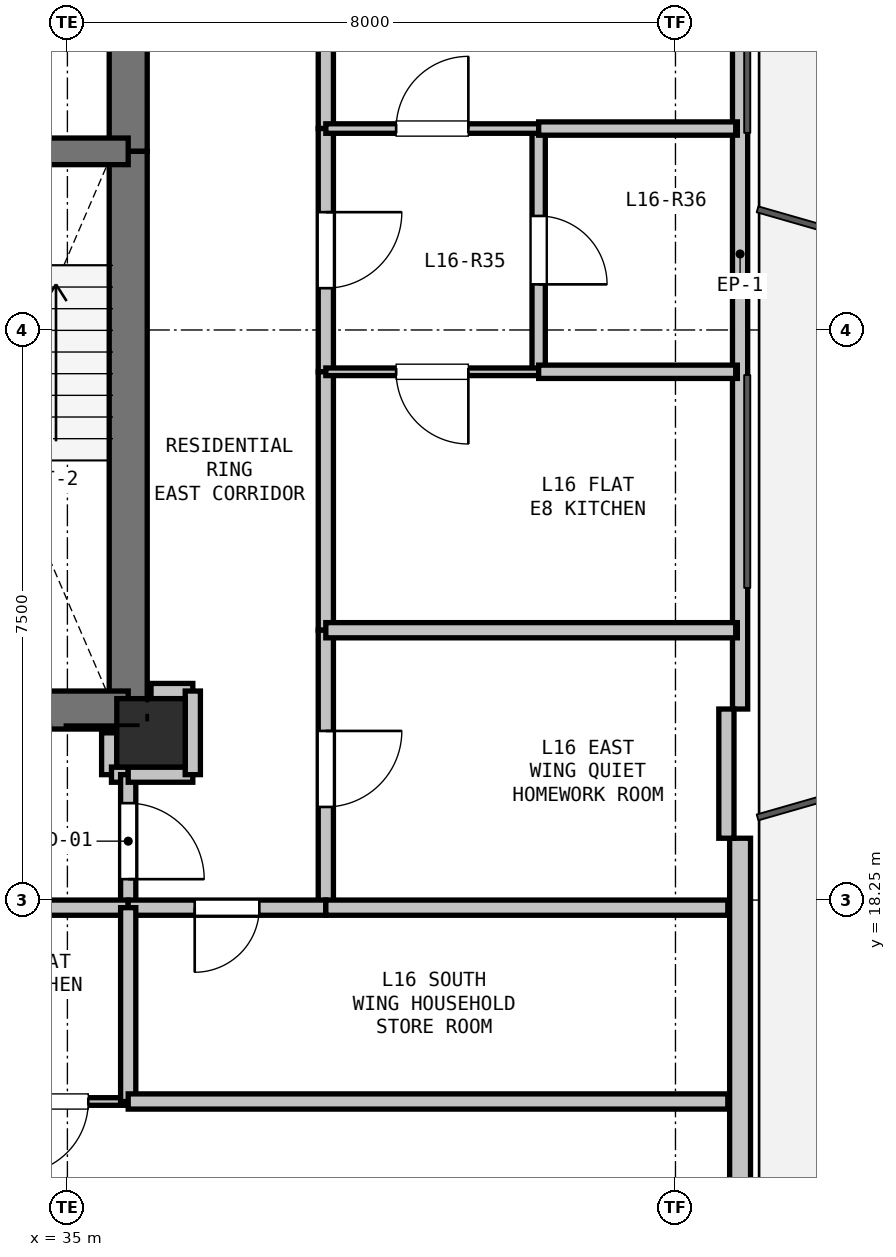
"""IFC4 building model, lengths in metres.
Left out: names, types, materials, properties, quantities, classifications, styles, units other than length and angle.
Written with IfcOpenShell. Run it as: python <this file> out.ifc"""

import sys

from ifc_helpers import new_model, si_unit, direction, frame, frame_2d, origin, origin_2d, place, context, subcontext, project, spatial, rectangle, extrude, element, fill, save


model = new_model("IFC4")
c1 = context("Model", 3, precision=1e-05, world=origin(), true_north=direction((0.0, 1.0)))
c2 = subcontext(c1, "Body", "Model", "MODEL_VIEW")
j1 = project(units=[si_unit("LENGTHUNIT", "METRE"), si_unit("PLANEANGLEUNIT", "RADIAN")], contexts=[c1])
p1 = place(None, origin())
s1 = spatial("IfcSite", under=j1, at=p1, CompositionType="ELEMENT")
p2 = place(p1, origin())
s2 = spatial("IfcBuilding", under=s1, at=p2, CompositionType="ELEMENT")
p3 = place(p2, frame((0.0, 0.0, 58.8)))
s3 = spatial("IfcBuildingStorey", under=s2, at=p3, CompositionType="ELEMENT", Elevation=58.8)
p4 = place(p3, frame((36.1, 20.45, 0.0), z_axis=(0.0, 0.0, 1.0), x_axis=(1.0, 0.0, 0.0)))
e1 = element("IfcColumn", 1, at=p4, inside=s3, PredefinedType="COLUMN", context=c2, shape_type="SweptSolid", body=[
    extrude(rectangle(XDim=0.9, YDim=0.9, at=origin_2d()), origin(), (0.0, 0.0, 1.0), 3.3),
])
p5 = place(p3, frame((43.85, 32.737, 0.0), z_axis=(0.0, 0.0, 1.0), x_axis=(0.0, -1.0, 0.0)))
e2 = element("IfcWall", 2, at=p5, inside=s3, PredefinedType="PARAPET", context=c2, shape_type="SweptSolid", body=[
    extrude(rectangle(XDim=11.973, YDim=0.2, at=frame_2d((5.987, 0.0))), origin(), (0.0, 0.0, 1.0), 0.2),
])
p6 = place(p3, frame((43.85, 19.063, 0.0), z_axis=(0.0, 0.0, 1.0), x_axis=(0.0, -1.0, 0.0)))
e3 = element("IfcWall", 3, at=p6, inside=s3, PredefinedType="SOLIDWALL", context=c2, shape_type="SweptSolid", body=[
    extrude(rectangle(XDim=12.673, YDim=0.275, at=frame_2d((6.336, 0.0))), origin(), (0.0, 0.0, 1.0), 2.64),
])
p7 = place(p3, frame((43.67, 20.763, 0.0), z_axis=(0.0, 0.0, 1.0), x_axis=(0.0, -1.0, 0.0)))
e4 = element("IfcWall", 4, at=p7, inside=s3, PredefinedType="PARAPET", context=c2, shape_type="SweptSolid", body=[
    extrude(rectangle(XDim=1.7, YDim=0.2, at=frame_2d((0.85, 0.0))), origin(), (0.0, 0.0, 1.0), 2.64),
])
p8 = place(p3, frame((35.8, 32.75, 0.0), z_axis=(0.0, 0.0, 1.0), x_axis=(0.0, -1.0, 0.0)))
e5 = element("IfcWall", 5, at=p8, inside=s3, PredefinedType="SHEAR", context=c2, shape_type="SweptSolid", body=[
    extrude(rectangle(XDim=4.65, YDim=0.5, at=frame_2d((2.325, 0.0))), origin(), (0.0, 0.0, 1.0), 3.02),
])
p9 = place(p3, frame((35.8, 28.1, 0.0), z_axis=(0.0, 0.0, 1.0), x_axis=(0.0, -1.0, 0.0)))
e6 = element("IfcWall", 6, at=p9, inside=s3, PredefinedType="SHEAR", context=c2, shape_type="SweptSolid", body=[
    extrude(rectangle(XDim=7.35, YDim=0.5, at=frame_2d((3.675, 0.0))), origin(), (0.0, 0.0, 1.0), 3.02),
])
p10 = place(p3, frame((35.8, 20.75, 0.0), z_axis=(0.0, 0.0, 1.0), x_axis=(-1.0, 0.0, 0.0)))
e7 = element("IfcWall", 7, at=p10, inside=s3, PredefinedType="SHEAR", context=c2, shape_type="SweptSolid", body=[
    extrude(rectangle(XDim=3.45, YDim=0.5, at=frame_2d((1.725, 0.0))), origin(), (0.0, 0.0, 1.0), 3.02),
])
p11 = place(p3, frame((32.35, 28.1, 0.0), z_axis=(0.0, 0.0, 1.0), x_axis=(1.0, 0.0, 0.0)))
e8 = element("IfcWall", 8, at=p11, inside=s3, PredefinedType="SHEAR", context=c2, shape_type="SweptSolid", body=[
    extrude(rectangle(XDim=3.45, YDim=0.35, at=frame_2d((1.725, 0.0))), origin(), (0.0, 0.0, 1.0), 3.02),
])
p12 = place(p11, frame((1.15, 0.0, 0.0)))
e9 = element("IfcOpeningElement", 9, at=p12, cuts=e8, PredefinedType="OPENING", context=c2, shape_type="SweptSolid", body=[
    extrude(rectangle(XDim=1.15, YDim=2.15, at=frame_2d((0.575, 1.075))), frame((0.0, 0.185, 0.0), z_axis=(0.0, -1.0, 0.0), x_axis=(1.0, 0.0, 0.0)), (0.0, 0.0, 1.0), 0.37),
])
p13 = place(p3, frame((35.55, 20.45, 0.0), z_axis=(0.0, 0.0, 1.0), x_axis=(0.0, -1.0, 0.0)))
e10 = element("IfcWall", 10, at=p13, inside=s3, PredefinedType="PARTITIONING", context=c2, shape_type="SweptSolid", body=[
    extrude(rectangle(XDim=0.55, YDim=0.2, at=frame_2d((0.275, 0.0))), origin(), (0.0, 0.0, 1.0), 2.468),
])
p14 = place(p3, frame((35.58, 19.9, 0.0), z_axis=(0.0, 0.0, 1.0), x_axis=(1.0, 0.0, 0.0)))
e11 = element("IfcWall", 11, at=p14, inside=s3, PredefinedType="PARTITIONING", context=c2, shape_type="SweptSolid", body=[
    extrude(rectangle(XDim=0.22, YDim=0.2, at=frame_2d((0.11, 0.0))), origin(), (0.0, 0.0, 1.0), 3.02),
])
p15 = place(p3, frame((35.8, 19.9, 0.0), z_axis=(0.0, 0.0, 1.0), x_axis=(0.0, -1.0, 0.0)))
e12 = element("IfcWall", 12, at=p15, inside=s3, PredefinedType="PARTITIONING", context=c2, shape_type="SweptSolid", body=[
    extrude(rectangle(XDim=1.75, YDim=0.2, at=frame_2d((0.875, 0.0))), origin(), (0.0, 0.0, 1.0), 3.02),
])
p16 = place(p15, frame((0.375, 0.0, 0.0)))
e13 = element("IfcOpeningElement", 13, at=p16, cuts=e12, PredefinedType="OPENING", context=c2, shape_type="SweptSolid", body=[
    extrude(rectangle(XDim=1.0, YDim=2.15, at=frame_2d((0.5, 1.075))), frame((0.0, 0.11, 0.0), z_axis=(0.0, -1.0, 0.0), x_axis=(1.0, 0.0, 0.0)), (0.0, 0.0, 1.0), 0.22),
])
p17 = place(p3, frame((35.8, 18.15, 0.0), z_axis=(0.0, 0.0, 1.0), x_axis=(-1.0, 0.0, 0.0)))
e14 = element("IfcWall", 14, at=p17, inside=s3, PredefinedType="PARTITIONING", context=c2, shape_type="SweptSolid", body=[
    extrude(rectangle(XDim=3.6, YDim=0.2, at=frame_2d((1.8, 0.0))), origin(), (0.0, 0.0, 1.0), 3.02),
])
p18 = place(p3, frame((36.65, 21.0, 0.0), z_axis=(0.0, 0.0, 1.0), x_axis=(-1.0, 0.0, 0.0)))
e15 = element("IfcWall", 15, at=p18, inside=s3, PredefinedType="PARTITIONING", context=c2, shape_type="SweptSolid", body=[
    extrude(rectangle(XDim=0.55, YDim=0.2, at=frame_2d((0.275, 0.0))), origin(), (0.0, 0.0, 1.0), 2.468),
])
p19 = place(p3, frame((38.4, 35.35, 0.0), z_axis=(0.0, 0.0, 1.0), x_axis=(0.0, -1.0, 0.0)))
e16 = element("IfcWall", 16, at=p19, inside=s3, PredefinedType="PARTITIONING", context=c2, shape_type="SweptSolid", body=[
    extrude(rectangle(XDim=6.95, YDim=0.2, at=frame_2d((3.475, 0.0))), origin(), (0.0, 0.0, 1.0), 2.317),
])
p20 = place(p3, frame((38.4, 28.4, 0.0), z_axis=(0.0, 0.0, 1.0), x_axis=(0.0, -1.0, 0.0)))
e17 = element("IfcWall", 17, at=p20, inside=s3, PredefinedType="PARTITIONING", context=c2, shape_type="SweptSolid", body=[
    extrude(rectangle(XDim=3.2, YDim=0.2, at=frame_2d((1.6, 0.0))), origin(), (0.0, 0.0, 1.0), 3.02),
])
p21 = place(p20, frame((1.1, 0.0, 0.0)))
e18 = element("IfcOpeningElement", 18, at=p21, cuts=e17, PredefinedType="OPENING", context=c2, shape_type="SweptSolid", body=[
    extrude(rectangle(XDim=1.0, YDim=2.15, at=frame_2d((0.5, 1.075))), frame((0.0, 0.11, 0.0), z_axis=(0.0, -1.0, 0.0), x_axis=(1.0, 0.0, 0.0)), (0.0, 0.0, 1.0), 0.22),
])
p22 = place(p3, frame((38.4, 25.2, 0.0), z_axis=(0.0, 0.0, 1.0), x_axis=(0.0, -1.0, 0.0)))
e19 = element("IfcWall", 19, at=p22, inside=s3, PredefinedType="PARTITIONING", context=c2, shape_type="SweptSolid", body=[
    extrude(rectangle(XDim=3.4, YDim=0.2, at=frame_2d((1.7, 0.0))), origin(), (0.0, 0.0, 1.0), 3.02),
])
p23 = place(p3, frame((38.4, 21.8, 0.0), z_axis=(0.0, 0.0, 1.0), x_axis=(0.0, -1.0, 0.0)))
e20 = element("IfcWall", 20, at=p23, inside=s3, PredefinedType="PARTITIONING", context=c2, shape_type="SweptSolid", body=[
    extrude(rectangle(XDim=3.65, YDim=0.2, at=frame_2d((1.825, 0.0))), origin(), (0.0, 0.0, 1.0), 3.02),
])
p24 = place(p23, frame((1.325, 0.0, 0.0)))
e21 = element("IfcOpeningElement", 21, at=p24, cuts=e20, PredefinedType="OPENING", context=c2, shape_type="SweptSolid", body=[
    extrude(rectangle(XDim=1.0, YDim=2.15, at=frame_2d((0.5, 1.075))), frame((0.0, 0.11, 0.0), z_axis=(0.0, -1.0, 0.0), x_axis=(1.0, 0.0, 0.0)), (0.0, 0.0, 1.0), 0.22),
])
p25 = place(p3, frame((38.4, 18.15, 0.0), z_axis=(0.0, 0.0, 1.0), x_axis=(-1.0, 0.0, 0.0)))
e22 = element("IfcWall", 22, at=p25, inside=s3, PredefinedType="PARTITIONING", context=c2, shape_type="SweptSolid", body=[
    extrude(rectangle(XDim=2.6, YDim=0.2, at=frame_2d((1.3, 0.0))), origin(), (0.0, 0.0, 1.0), 2.317),
])
p26 = place(p25, frame((0.875, 0.0, 0.0)))
e23 = element("IfcOpeningElement", 23, at=p26, cuts=e22, PredefinedType="OPENING", context=c2, shape_type="SweptSolid", body=[
    extrude(rectangle(XDim=0.85, YDim=2.1, at=frame_2d((0.425, 1.05))), frame((0.0, 0.11, 0.0), z_axis=(0.0, -1.0, 0.0), x_axis=(1.0, 0.0, 0.0)), (0.0, 0.0, 1.0), 0.22),
])
p27 = place(p3, frame((35.8, 19.9, 0.0), z_axis=(0.0, 0.0, 1.0), x_axis=(1.0, 0.0, 0.0)))
e24 = element("IfcWall", 24, at=p27, inside=s3, PredefinedType="PARTITIONING", context=c2, shape_type="SweptSolid", body=[
    extrude(rectangle(XDim=0.85, YDim=0.2, at=frame_2d((0.425, 0.0))), origin(), (0.0, 0.0, 1.0), 2.317),
])
p28 = place(p3, frame((36.65, 19.9, 0.0), z_axis=(0.0, 0.0, 1.0), x_axis=(0.0, 1.0, 0.0)))
e25 = element("IfcWall", 25, at=p28, inside=s3, PredefinedType="PARTITIONING", context=c2, shape_type="SweptSolid", body=[
    extrude(rectangle(XDim=1.1, YDim=0.2, at=frame_2d((0.55, 0.0))), origin(), (0.0, 0.0, 1.0), 3.02),
])
p29 = place(p3, frame((41.2, 28.4, 0.0), z_axis=(0.0, 0.0, 1.0), x_axis=(0.0, -1.0, 0.0)))
e26 = element("IfcWall", 26, at=p29, inside=s3, PredefinedType="PLUMBINGWALL", context=c2, shape_type="SweptSolid", body=[
    extrude(rectangle(XDim=3.2, YDim=0.175, at=frame_2d((1.6, 0.0))), origin(), (0.0, 0.0, 1.0), 3.02),
])
p30 = place(p29, frame((1.15, 0.0, 0.0)))
e27 = element("IfcOpeningElement", 27, at=p30, cuts=e26, PredefinedType="OPENING", context=c2, shape_type="SweptSolid", body=[
    extrude(rectangle(XDim=0.9, YDim=2.1, at=frame_2d((0.45, 1.05))), frame((0.0, 0.097, 0.0), z_axis=(0.0, -1.0, 0.0), x_axis=(1.0, 0.0, 0.0)), (0.0, 0.0, 1.0), 0.195),
])
p31 = place(p3, frame((41.2, 25.2, 0.0), z_axis=(0.0, 0.0, 1.0), x_axis=(-1.0, 0.0, 0.0)))
e28 = element("IfcWall", 28, at=p31, inside=s3, PredefinedType="PARTITIONING", context=c2, shape_type="SweptSolid", body=[
    extrude(rectangle(XDim=2.8, YDim=0.1, at=frame_2d((1.4, 0.0))), origin(), (0.0, 0.0, 1.0), 3.02),
])
p32 = place(p31, frame((0.925, 0.0, 0.0)))
e29 = element("IfcOpeningElement", 29, at=p32, cuts=e28, PredefinedType="OPENING", context=c2, shape_type="SweptSolid", body=[
    extrude(rectangle(XDim=0.95, YDim=2.1, at=frame_2d((0.475, 1.05))), frame((0.0, 0.06, 0.0), z_axis=(0.0, -1.0, 0.0), x_axis=(1.0, 0.0, 0.0)), (0.0, 0.0, 1.0), 0.12),
])
p33 = place(p3, frame((38.4, 28.4, 0.0), z_axis=(0.0, 0.0, 1.0), x_axis=(1.0, 0.0, 0.0)))
e30 = element("IfcWall", 30, at=p33, inside=s3, PredefinedType="PARTITIONING", context=c2, shape_type="SweptSolid", body=[
    extrude(rectangle(XDim=2.8, YDim=0.125, at=frame_2d((1.4, 0.0))), origin(), (0.0, 0.0, 1.0), 3.02),
])
p34 = place(p33, frame((0.925, 0.0, 0.0)))
e31 = element("IfcOpeningElement", 31, at=p34, cuts=e30, PredefinedType="OPENING", context=c2, shape_type="SweptSolid", body=[
    extrude(rectangle(XDim=0.95, YDim=2.1, at=frame_2d((0.475, 1.05))), frame((0.0, 0.073, 0.0), z_axis=(0.0, -1.0, 0.0), x_axis=(1.0, 0.0, 0.0)), (0.0, 0.0, 1.0), 0.145),
])
p35 = place(p3, frame((35.8, 15.6, 0.0), z_axis=(0.0, 0.0, 1.0), x_axis=(-1.0, 0.0, 0.0)))
e32 = element("IfcWall", 32, at=p35, inside=s3, PredefinedType="PARTITIONING", context=c2, shape_type="SweptSolid", body=[
    extrude(rectangle(XDim=2.0, YDim=0.1, at=frame_2d((1.0, 0.0))), origin(), (0.0, 0.0, 1.0), 3.02),
])
p36 = place(p35, frame((0.525, 0.0, 0.0)))
e33 = element("IfcOpeningElement", 33, at=p36, cuts=e32, PredefinedType="OPENING", context=c2, shape_type="SweptSolid", body=[
    extrude(rectangle(XDim=0.95, YDim=2.1, at=frame_2d((0.475, 1.05))), frame((0.0, 0.06, 0.0), z_axis=(0.0, -1.0, 0.0), x_axis=(1.0, 0.0, 0.0)), (0.0, 0.0, 1.0), 0.12),
])
p37 = place(p3, frame((35.8, 18.15, 0.0), z_axis=(0.0, 0.0, 1.0), x_axis=(0.0, -1.0, 0.0)))
e34 = element("IfcWall", 34, at=p37, inside=s3, PredefinedType="PARTITIONING", context=c2, shape_type="SweptSolid", body=[
    extrude(rectangle(XDim=2.55, YDim=0.2, at=frame_2d((1.275, 0.0))), origin(), (0.0, 0.0, 1.0), 3.02),
])
for number, where, z_axis, x_axis in (
    (35, (41.2, 28.4, 0.0), (0.0, 0.0, 1.0), (1.0, 0.0, 0.0)),
    (36, (43.814, 25.2, 0.0), (0.0, 0.0, 1.0), (-1.0, 0.0, 0.0)),
):
    element("IfcWall", number, at=place(p3, frame(where, z_axis=z_axis, x_axis=x_axis)), inside=s3, PredefinedType="PLUMBINGWALL", context=c2, shape_type="SweptSolid", body=[
        extrude(rectangle(XDim=2.614, YDim=0.175, at=frame_2d((1.307, 0.0))), origin(), (0.0, 0.0, 1.0), 2.365),
    ])
p38 = place(p3, frame((43.814, 21.8, 0.0), z_axis=(0.0, 0.0, 1.0), x_axis=(-1.0, 0.0, 0.0)))
e37 = element("IfcWall", 37, at=p38, inside=s3, PredefinedType="PARTITIONING", context=c2, shape_type="SweptSolid", body=[
    extrude(rectangle(XDim=5.414, YDim=0.2, at=frame_2d((2.707, 0.0))), origin(), (0.0, 0.0, 1.0), 2.365),
])
p39 = place(p3, frame((38.4, 18.15, 0.0), z_axis=(0.0, 0.0, 1.0), x_axis=(1.0, 0.0, 0.0)))
e38 = element("IfcWall", 38, at=p39, inside=s3, PredefinedType="PARTITIONING", context=c2, shape_type="SweptSolid", body=[
    extrude(rectangle(XDim=5.289, YDim=0.2, at=frame_2d((2.644, 0.0))), origin(), (0.0, 0.0, 1.0), 2.365),
])
p40 = place(p3, frame((43.688, 15.6, 0.0), z_axis=(0.0, 0.0, 1.0), x_axis=(-1.0, 0.0, 0.0)))
e39 = element("IfcWall", 39, at=p40, inside=s3, PredefinedType="PARTITIONING", context=c2, shape_type="SweptSolid", body=[
    extrude(rectangle(XDim=7.888, YDim=0.2, at=frame_2d((3.944, 0.0))), origin(), (0.0, 0.0, 1.0), 2.317),
])
p41 = place(p16, origin())
e40 = element("IfcDoor", 40, at=p41, inside=s3, OperationType="SINGLE_SWING_RIGHT", PredefinedType="DOOR", context=c2, shape_type="SweptSolid", body=[
    extrude(rectangle(XDim=1.0, YDim=2.15, at=frame_2d((0.5, 1.075))), frame((0.0, 0.025, 0.0), z_axis=(0.0, -1.0, 0.0), x_axis=(1.0, 0.0, 0.0)), (0.0, 0.0, 1.0), 0.05),
])
fill(e13, e40)
p42 = place(p21, origin())
e41 = element("IfcDoor", 41, at=p42, inside=s3, OperationType="SINGLE_SWING_LEFT", PredefinedType="DOOR", context=c2, shape_type="SweptSolid", body=[
    extrude(rectangle(XDim=1.0, YDim=2.15, at=frame_2d((0.5, 1.075))), frame((0.0, 0.025, 0.0), z_axis=(0.0, -1.0, 0.0), x_axis=(1.0, 0.0, 0.0)), (0.0, 0.0, 1.0), 0.05),
])
fill(e18, e41)
p43 = place(p26, origin())
e42 = element("IfcDoor", 42, at=p43, inside=s3, OperationType="SINGLE_SWING_RIGHT", PredefinedType="DOOR", context=c2, shape_type="SweptSolid", body=[
    extrude(rectangle(XDim=0.85, YDim=2.1, at=frame_2d((0.425, 1.05))), frame((0.0, 0.025, 0.0), z_axis=(0.0, -1.0, 0.0), x_axis=(1.0, 0.0, 0.0)), (0.0, 0.0, 1.0), 0.05),
])
fill(e23, e42)
p44 = place(p24, origin())
e43 = element("IfcDoor", 43, at=p44, inside=s3, OperationType="SINGLE_SWING_LEFT", PredefinedType="DOOR", context=c2, shape_type="SweptSolid", body=[
    extrude(rectangle(XDim=1.0, YDim=2.15, at=frame_2d((0.5, 1.075))), frame((0.0, 0.025, 0.0), z_axis=(0.0, -1.0, 0.0), x_axis=(1.0, 0.0, 0.0)), (0.0, 0.0, 1.0), 0.05),
])
fill(e21, e43)
p45 = place(p30, origin())
e44 = element("IfcDoor", 44, at=p45, inside=s3, OperationType="SINGLE_SWING_RIGHT", PredefinedType="DOOR", context=c2, shape_type="SweptSolid", body=[
    extrude(rectangle(XDim=0.9, YDim=2.1, at=frame_2d((0.45, 1.05))), frame((0.0, 0.025, 0.0), z_axis=(0.0, -1.0, 0.0), x_axis=(1.0, 0.0, 0.0)), (0.0, 0.0, 1.0), 0.05),
])
fill(e27, e44)
p46 = place(p32, origin())
e45 = element("IfcDoor", 45, at=p46, inside=s3, OperationType="SINGLE_SWING_LEFT", PredefinedType="DOOR", context=c2, shape_type="SweptSolid", body=[
    extrude(rectangle(XDim=0.95, YDim=2.1, at=frame_2d((0.475, 1.05))), frame((0.0, 0.025, 0.0), z_axis=(0.0, -1.0, 0.0), x_axis=(1.0, 0.0, 0.0)), (0.0, 0.0, 1.0), 0.05),
])
fill(e29, e45)
p47 = place(p34, origin())
e46 = element("IfcDoor", 46, at=p47, inside=s3, OperationType="SINGLE_SWING_RIGHT", PredefinedType="DOOR", context=c2, shape_type="SweptSolid", body=[
    extrude(rectangle(XDim=0.95, YDim=2.1, at=frame_2d((0.475, 1.05))), frame((0.0, 0.025, 0.0), z_axis=(0.0, -1.0, 0.0), x_axis=(1.0, 0.0, 0.0)), (0.0, 0.0, 1.0), 0.05),
])
fill(e31, e46)
p48 = place(p36, origin())
e47 = element("IfcDoor", 47, at=p48, inside=s3, OperationType="SINGLE_SWING_RIGHT", PredefinedType="DOOR", context=c2, shape_type="SweptSolid", body=[
    extrude(rectangle(XDim=0.95, YDim=2.1, at=frame_2d((0.475, 1.05))), frame((0.0, 0.025, 0.0), z_axis=(0.0, -1.0, 0.0), x_axis=(1.0, 0.0, 0.0)), (0.0, 0.0, 1.0), 0.05),
])
fill(e33, e47)
save(model, sys.argv[1])
